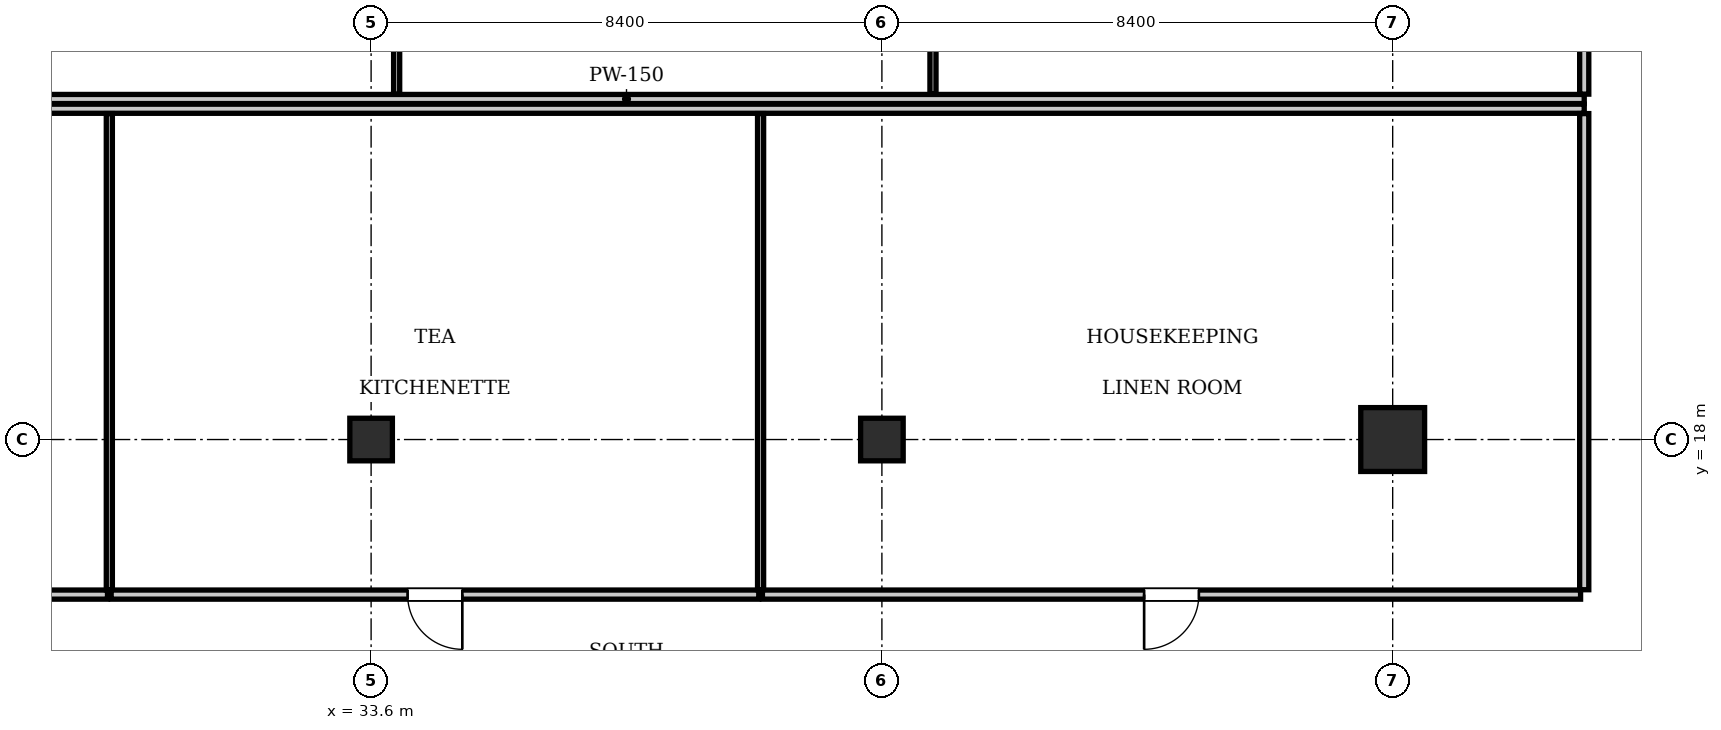
"""IFC4 building model, lengths in metres.
Left out: names, types, materials, properties, quantities, classifications, styles, units other than length and angle.
Written with IfcOpenShell. Run it as: python <this file> out.ifc"""

import sys

from ifc_helpers import new_model, si_unit, direction, frame, frame_2d, origin, origin_2d, place, context, subcontext, project, spatial, rectangle, i_section, extrude, element, fill, save


model = new_model("IFC4")
c1 = context("Model", 3, precision=1e-05, world=origin(), true_north=direction((0.0, 1.0)))
c2 = subcontext(c1, "Body", "Model", "MODEL_VIEW")
j1 = project(units=[si_unit("LENGTHUNIT", "METRE"), si_unit("PLANEANGLEUNIT", "RADIAN")], contexts=[c1])
p1 = place(None, origin())
s1 = spatial("IfcSite", under=j1, at=p1, CompositionType="ELEMENT")
p2 = place(p1, origin())
s2 = spatial("IfcBuilding", under=s1, at=p2, CompositionType="ELEMENT")
p3 = place(p2, frame((0.0, 0.0, 84.7)))
s3 = spatial("IfcBuildingStorey", under=s2, at=p3, CompositionType="ELEMENT", Elevation=84.7)
p4 = place(p3, frame((50.4, 18.0, 0.0), z_axis=(0.0, 0.0, 1.0), x_axis=(1.0, 0.0, 0.0)))
e1 = element("IfcColumn", 1, at=p4, inside=s3, PredefinedType="COLUMN", context=c2, shape_type="SweptSolid", body=[
    extrude(rectangle(XDim=1.05, YDim=1.05, at=origin_2d()), origin(), (0.0, 0.0, 1.0), 3.85),
])
for number, where, z_axis, x_axis in (
    (2, (33.6, 18.0, 0.0), (0.0, 0.0, 1.0), (1.0, 0.0, 0.0)),
    (3, (42.0, 18.0, 0.0), (0.0, 0.0, 1.0), (1.0, 0.0, 0.0)),
):
    element("IfcColumn", number, at=place(p3, frame(where, z_axis=z_axis, x_axis=x_axis)), inside=s3, PredefinedType="COLUMN", context=c2, shape_type="SweptSolid", body=[
        extrude(i_section(OverallWidth=0.7, OverallDepth=0.7, WebThickness=0.028, FlangeThickness=0.044, at=origin_2d()), origin(), (0.0, 0.0, 1.0), 3.85),
    ])
p5 = place(p3, frame((22.05, 23.6, 0.0), z_axis=(0.0, 0.0, 1.0), x_axis=(1.0, 0.0, 0.0)))
e4 = element("IfcWall", 4, at=p5, inside=s3, PredefinedType="PARTITIONING", context=c2, shape_type="SweptSolid", body=[
    extrude(rectangle(XDim=31.5, YDim=0.15, at=frame_2d((15.75, 0.0))), origin(), (0.0, 0.0, 1.0), 3.61),
])
p6 = place(p3, frame((53.55, 23.68, 0.0), z_axis=(0.0, 0.0, 1.0), x_axis=(0.0, 1.0, 0.0)))
e5 = element("IfcWall", 5, at=p6, inside=s3, PredefinedType="PARTITIONING", context=c2, shape_type="SweptSolid", body=[
    extrude(rectangle(XDim=7.84, YDim=0.15, at=frame_2d((3.92, 0.0))), origin(), (0.0, 0.0, 1.0), 3.61),
])
for number, where, z_axis, x_axis in (
    (6, (34.02, 23.68, 0.0), (0.0, 0.0, 1.0), (0.0, 1.0, 0.0)),
    (7, (42.84, 23.68, 0.0), (0.0, 0.0, 1.0), (0.0, 1.0, 0.0)),
):
    element("IfcWall", number, at=place(p3, frame(where, z_axis=z_axis, x_axis=x_axis)), inside=s3, PredefinedType="PARTITIONING", context=c2, shape_type="SweptSolid", body=[
        extrude(rectangle(XDim=7.84, YDim=0.1, at=frame_2d((3.92, 0.0))), origin(), (0.0, 0.0, 1.0), 3.61),
    ])
p7 = place(p3, frame((22.05, 23.44, 0.0), z_axis=(0.0, 0.0, 1.0), x_axis=(1.0, 0.0, 0.0)))
e8 = element("IfcWall", 8, at=p7, inside=s3, PredefinedType="PARTITIONING", context=c2, shape_type="SweptSolid", body=[
    extrude(rectangle(XDim=31.5, YDim=0.15, at=frame_2d((15.75, 0.0))), origin(), (0.0, 0.0, 1.0), 3.61),
])
p8 = place(p3, frame((53.55, 15.53, 0.0), z_axis=(0.0, 0.0, 1.0), x_axis=(0.0, 1.0, 0.0)))
e9 = element("IfcWall", 9, at=p8, inside=s3, PredefinedType="PARTITIONING", context=c2, shape_type="SweptSolid", body=[
    extrude(rectangle(XDim=7.83, YDim=0.15, at=frame_2d((3.915, 0.0))), origin(), (0.0, 0.0, 1.0), 3.61),
])
p9 = place(p3, frame((22.11, 15.45, 0.0), z_axis=(0.0, 0.0, 1.0), x_axis=(1.0, 0.0, 0.0)))
e10 = element("IfcWall", 10, at=p9, inside=s3, PredefinedType="PARTITIONING", context=c2, shape_type="SweptSolid", body=[
    extrude(rectangle(XDim=7.155, YDim=0.15, at=frame_2d((3.577, 0.0))), origin(), (0.0, 0.0, 1.0), 3.61),
])
p10 = place(p9, frame((3.127, 0.0, 0.0)))
e11 = element("IfcOpeningElement", 11, at=p10, cuts=e10, PredefinedType="OPENING", context=c2, shape_type="SweptSolid", body=[
    extrude(rectangle(XDim=0.9, YDim=2.1, at=frame_2d((0.45, 1.05))), frame((0.0, 0.085, 0.0), z_axis=(0.0, -1.0, 0.0), x_axis=(1.0, 0.0, 0.0)), (0.0, 0.0, 1.0), 0.17),
])
p11 = place(p3, frame((29.295, 15.53, 0.0), z_axis=(0.0, 0.0, 1.0), x_axis=(0.0, 1.0, 0.0)))
e12 = element("IfcWall", 12, at=p11, inside=s3, PredefinedType="PARTITIONING", context=c2, shape_type="SweptSolid", body=[
    extrude(rectangle(XDim=7.83, YDim=0.1, at=frame_2d((3.915, 0.0))), origin(), (0.0, 0.0, 1.0), 3.255),
])
p12 = place(p3, frame((29.325, 15.45, 0.0), z_axis=(0.0, 0.0, 1.0), x_axis=(1.0, 0.0, 0.0)))
e13 = element("IfcWall", 13, at=p12, inside=s3, PredefinedType="PARTITIONING", context=c2, shape_type="SweptSolid", body=[
    extrude(rectangle(XDim=10.65, YDim=0.15, at=frame_2d((5.325, 0.0))), origin(), (0.0, 0.0, 1.0), 3.61),
])
p13 = place(p12, frame((4.875, 0.0, 0.0)))
e14 = element("IfcOpeningElement", 14, at=p13, cuts=e13, PredefinedType="OPENING", context=c2, shape_type="SweptSolid", body=[
    extrude(rectangle(XDim=0.9, YDim=2.1, at=frame_2d((0.45, 1.05))), frame((0.0, 0.085, 0.0), z_axis=(0.0, -1.0, 0.0), x_axis=(1.0, 0.0, 0.0)), (0.0, 0.0, 1.0), 0.17),
])
p14 = place(p3, frame((40.005, 15.53, 0.0), z_axis=(0.0, 0.0, 1.0), x_axis=(0.0, 1.0, 0.0)))
e15 = element("IfcWall", 15, at=p14, inside=s3, PredefinedType="PARTITIONING", context=c2, shape_type="SweptSolid", body=[
    extrude(rectangle(XDim=7.83, YDim=0.1, at=frame_2d((3.915, 0.0))), origin(), (0.0, 0.0, 1.0), 3.61),
])
p15 = place(p3, frame((40.035, 15.45, 0.0), z_axis=(0.0, 0.0, 1.0), x_axis=(1.0, 0.0, 0.0)))
e16 = element("IfcWall", 16, at=p15, inside=s3, PredefinedType="PARTITIONING", context=c2, shape_type="SweptSolid", body=[
    extrude(rectangle(XDim=13.455, YDim=0.15, at=frame_2d((6.728, 0.0))), origin(), (0.0, 0.0, 1.0), 3.61),
])
p16 = place(p15, frame((6.278, 0.0, 0.0)))
e17 = element("IfcOpeningElement", 17, at=p16, cuts=e16, PredefinedType="OPENING", context=c2, shape_type="SweptSolid", body=[
    extrude(rectangle(XDim=0.9, YDim=2.1, at=frame_2d((0.45, 1.05))), frame((0.0, 0.085, 0.0), z_axis=(0.0, -1.0, 0.0), x_axis=(1.0, 0.0, 0.0)), (0.0, 0.0, 1.0), 0.17),
])
p17 = place(p13, frame((0.9, 0.0, 0.0), z_axis=(0.0, 0.0, 1.0), x_axis=(-1.0, 0.0, 0.0)))
e18 = element("IfcDoor", 18, at=p17, inside=s3, OperationType="SINGLE_SWING_LEFT", PredefinedType="DOOR", context=c2, shape_type="SweptSolid", body=[
    extrude(rectangle(XDim=0.9, YDim=2.1, at=frame_2d((0.45, 1.05))), frame((0.0, 0.025, 0.0), z_axis=(0.0, -1.0, 0.0), x_axis=(1.0, 0.0, 0.0)), (0.0, 0.0, 1.0), 0.05),
])
fill(e14, e18)
p18 = place(p16, frame((0.9, 0.0, 0.0), z_axis=(0.0, 0.0, 1.0), x_axis=(-1.0, 0.0, 0.0)))
e19 = element("IfcDoor", 19, at=p18, inside=s3, OperationType="SINGLE_SWING_RIGHT", PredefinedType="DOOR", context=c2, shape_type="SweptSolid", body=[
    extrude(rectangle(XDim=0.9, YDim=2.1, at=frame_2d((0.45, 1.05))), frame((0.0, 0.025, 0.0), z_axis=(0.0, -1.0, 0.0), x_axis=(1.0, 0.0, 0.0)), (0.0, 0.0, 1.0), 0.05),
])
fill(e17, e19)
save(model, sys.argv[1])
